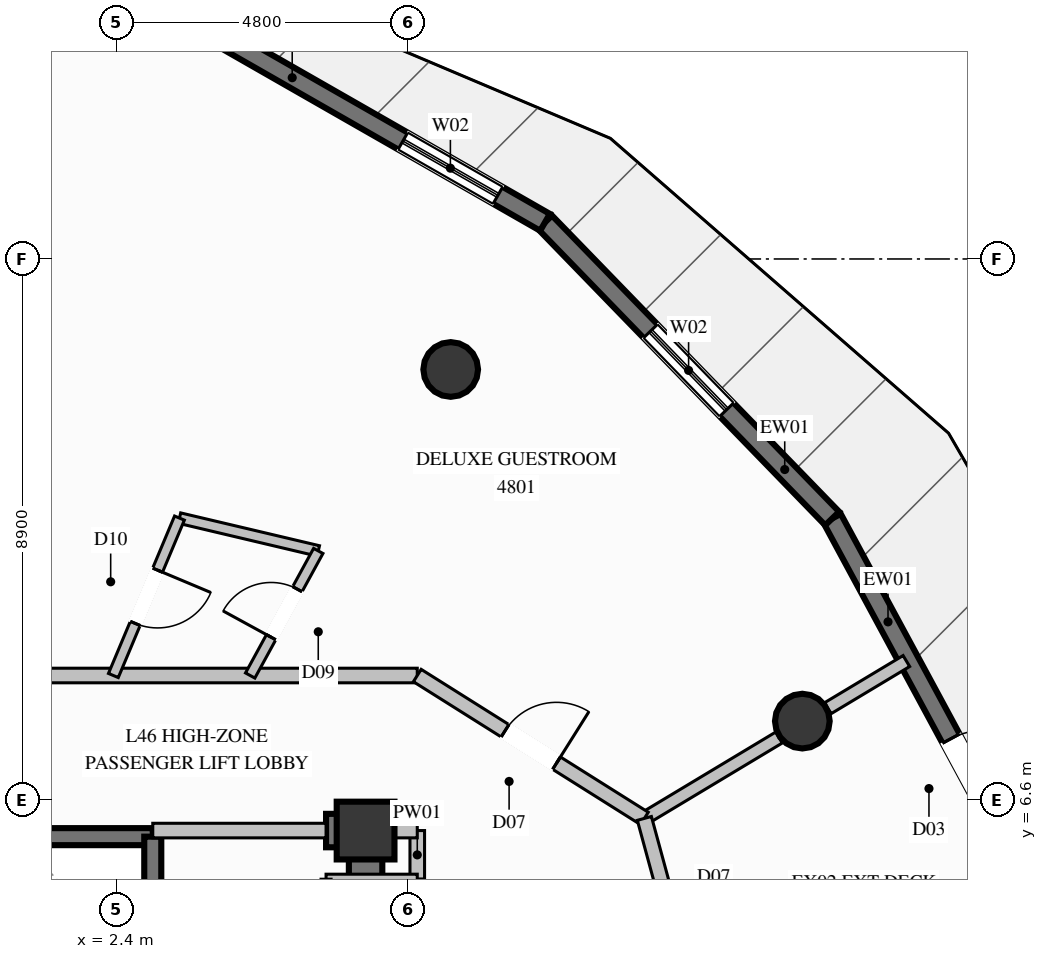
"""IFC4 building model, lengths in metres.
Left out: names, types, materials, properties, quantities, classifications, styles, units other than length and angle.
Written with IfcOpenShell. Run it as: python <this file> out.ifc"""

import sys

from ifc_helpers import new_model, si_unit, direction, frame, frame_2d, origin, origin_2d, place, context, subcontext, project, spatial, rectangle, circle, extrude, element, fill, save


model = new_model("IFC4")
c1 = context("Model", 3, precision=1e-05, world=origin(), true_north=direction((0.0, 1.0)))
c2 = subcontext(c1, "Body", "Model", "MODEL_VIEW")
j1 = project(units=[si_unit("LENGTHUNIT", "METRE"), si_unit("PLANEANGLEUNIT", "RADIAN")], contexts=[c1])
p1 = place(None, origin())
s1 = spatial("IfcSite", under=j1, at=p1, CompositionType="ELEMENT")
p2 = place(p1, origin())
s2 = spatial("IfcBuilding", under=s1, at=p2, CompositionType="ELEMENT")
p3 = place(p2, frame((0.0, 0.0, 180.4)))
s3 = spatial("IfcBuildingStorey", under=s2, at=p3, CompositionType="ELEMENT", Elevation=180.4)
p4 = place(p3, frame((6.5, 6.1, 0.0), z_axis=(0.0, 0.0, 1.0), x_axis=(1.0, 0.0, 0.0)))
e1 = element("IfcColumn", 1, at=p4, inside=s3, PredefinedType="COLUMN", context=c2, shape_type="SweptSolid", body=[
    extrude(rectangle(XDim=0.95, YDim=0.95, at=origin_2d()), origin(), (0.0, 0.0, 1.0), 3.6),
])
p5 = place(p3, frame((5.85, 6.1, 0.0), z_axis=(0.0, 0.0, 1.0), x_axis=(1.0, 0.0, 0.0)))
e2 = element("IfcWall", 2, at=p5, inside=s3, PredefinedType="SHEAR", context=c2, shape_type="SweptSolid", body=[
    extrude(rectangle(XDim=0.375, YDim=0.55, at=frame_2d((0.188, 0.0))), origin(), (0.0, 0.0, 1.0), 3.6),
])
p6 = place(p3, frame((6.5, 3.35, 0.0), z_axis=(0.0, 0.0, 1.0), x_axis=(0.0, 1.0, 0.0)))
e3 = element("IfcWall", 3, at=p6, inside=s3, PredefinedType="SHEAR", context=c2, shape_type="SweptSolid", body=[
    extrude(rectangle(XDim=3.025, YDim=0.55, at=frame_2d((1.512, 0.0))), origin(), (0.0, 0.0, 1.0), 3.6),
])
for number, where, z_axis, x_axis in (
    (4, (13.683, 7.9, 0.0), (0.0, 0.0, 1.0), (1.0, 0.0, 0.0)),
    (5, (7.9, 13.683, 0.0), (0.0, 0.0, 1.0), (1.0, 0.0, 0.0)),
):
    element("IfcColumn", number, at=place(p3, frame(where, z_axis=z_axis, x_axis=x_axis)), inside=s3, PredefinedType="COLUMN", context=c2, shape_type="SweptSolid", body=[
        extrude(circle(Radius=0.45, at=origin_2d()), origin(), (0.0, 0.0, 1.0), 3.6),
    ])
p7 = place(p3, frame((14.174, 11.232, 0.0), z_axis=(0.0, 0.0, 1.0), x_axis=(0.475159501302, -0.879899680829, 0.0)))
e6 = element("IfcWall", 6, at=p7, inside=s3, PredefinedType="SOLIDWALL", context=c2, shape_type="SweptSolid", body=[
    extrude(rectangle(XDim=6.785, YDim=0.32, at=frame_2d((3.393, 0.0))), origin(), (0.0, 0.0, 1.0), 3.36),
])
p8 = place(p7, frame((4.114, 0.0, 0.0)))
e7 = element("IfcOpeningElement", 7, at=p8, cuts=e6, PredefinedType="OPENING", context=c2, shape_type="SweptSolid", body=[
    extrude(rectangle(XDim=1.1, YDim=2.2, at=frame_2d((0.55, 1.1))), frame((0.0, 0.17, 0.0), z_axis=(0.0, -1.0, 0.0), x_axis=(1.0, 0.0, 0.0)), (0.0, 0.0, 1.0), 0.34),
])
p9 = place(p3, frame((9.451, 16.103, 0.0), z_axis=(0.0, 0.0, 1.0), x_axis=(0.696119985346, -0.71792545992, 0.0)))
e8 = element("IfcWall", 8, at=p9, inside=s3, PredefinedType="SOLIDWALL", context=c2, shape_type="SweptSolid", body=[
    extrude(rectangle(XDim=6.785, YDim=0.32, at=frame_2d((3.393, 0.0))), origin(), (0.0, 0.0, 1.0), 3.36),
])
p10 = place(p9, frame((2.492, 0.0, 0.35)))
e9 = element("IfcOpeningElement", 9, at=p10, cuts=e8, PredefinedType="OPENING", context=c2, shape_type="SweptSolid", body=[
    extrude(rectangle(XDim=1.8, YDim=2.6, at=frame_2d((0.9, 1.3))), frame((0.0, 0.17, 0.0), z_axis=(0.0, -1.0, 0.0), x_axis=(1.0, 0.0, 0.0)), (0.0, 0.0, 1.0), 0.34),
])
p11 = place(p3, frame((3.69, 19.398, 0.0), z_axis=(0.0, 0.0, 1.0), x_axis=(0.868052920032, -0.496471678974, 0.0)))
e10 = element("IfcWall", 10, at=p11, inside=s3, PredefinedType="SOLIDWALL", context=c2, shape_type="SweptSolid", body=[
    extrude(rectangle(XDim=6.637, YDim=0.32, at=frame_2d((3.318, 0.0))), origin(), (0.0, 0.0, 1.0), 3.36),
])
p12 = place(p11, frame((3.944, 0.0, 0.35)))
e11 = element("IfcOpeningElement", 11, at=p12, cuts=e10, PredefinedType="OPENING", context=c2, shape_type="SweptSolid", body=[
    extrude(rectangle(XDim=1.8, YDim=2.6, at=frame_2d((0.9, 1.3))), frame((0.0, 0.17, 0.0), z_axis=(0.0, -1.0, 0.0), x_axis=(1.0, 0.0, 0.0)), (0.0, 0.0, 1.0), 0.34),
])
p13 = place(p3, frame((3.0, 6.0, 0.0), z_axis=(0.0, 0.0, 1.0), x_axis=(-1.0, 0.0, 0.0)))
e12 = element("IfcWall", 12, at=p13, inside=s3, PredefinedType="SOLIDWALL", context=c2, shape_type="SweptSolid", body=[
    extrude(rectangle(XDim=2.2, YDim=0.28, at=frame_2d((1.1, 0.0))), origin(), (0.0, 0.0, 1.0), 3.36),
])
p14 = place(p3, frame((3.0, 3.5, 0.0), z_axis=(0.0, 0.0, 1.0), x_axis=(0.0, 1.0, 0.0)))
e13 = element("IfcWall", 13, at=p14, inside=s3, PredefinedType="SOLIDWALL", context=c2, shape_type="SweptSolid", body=[
    extrude(rectangle(XDim=2.5, YDim=0.28, at=frame_2d((1.25, 0.0))), origin(), (0.0, 0.0, 1.0), 3.36),
])
p15 = place(p3, frame((-7.35, 8.65, 0.0), z_axis=(0.0, 0.0, 1.0), x_axis=(1.0, 0.0, 0.0)))
e14 = element("IfcWall", 14, at=p15, inside=s3, PredefinedType="PARTITIONING", context=c2, shape_type="SweptSolid", body=[
    extrude(rectangle(XDim=14.7, YDim=0.24, at=frame_2d((7.35, 0.0))), origin(), (0.0, 0.0, 1.0), 3.36),
])
p16 = place(p3, frame((3.0, 6.1, 0.0), z_axis=(0.0, 0.0, 1.0), x_axis=(1.0, 0.0, 0.0)))
e15 = element("IfcWall", 15, at=p16, inside=s3, PredefinedType="PARTITIONING", context=c2, shape_type="SweptSolid", body=[
    extrude(rectangle(XDim=2.85, YDim=0.24, at=frame_2d((1.425, 0.0))), origin(), (0.0, 0.0, 1.0), 2.445),
])
p17 = place(p3, frame((7.35, 5.3, 0.0), z_axis=(0.0, 0.0, 1.0), x_axis=(0.0, 1.0, 0.0)))
e16 = element("IfcWall", 16, at=p17, inside=s3, PredefinedType="PARTITIONING", context=c2, shape_type="SweptSolid", body=[
    extrude(rectangle(XDim=0.8, YDim=0.24, at=frame_2d((0.4, 0.0))), origin(), (0.0, 0.0, 1.0), 2.445),
])
p18 = place(p3, frame((6.5, 6.1, 0.0), z_axis=(0.0, 0.0, 1.0), x_axis=(1.0, 0.0, 0.0)))
e17 = element("IfcWall", 17, at=p18, inside=s3, PredefinedType="PARTITIONING", context=c2, shape_type="SweptSolid", body=[
    extrude(rectangle(XDim=0.85, YDim=0.24, at=frame_2d((0.425, 0.0))), origin(), (0.0, 0.0, 1.0), 2.801),
])
p19 = place(p3, frame((7.35, 5.3, 0.0), z_axis=(0.0, 0.0, 1.0), x_axis=(-1.0, 0.0, 0.0)))
e18 = element("IfcWall", 18, at=p19, inside=s3, PredefinedType="PARTITIONING", context=c2, shape_type="SweptSolid", body=[
    extrude(rectangle(XDim=1.5, YDim=0.165, at=frame_2d((0.75, 0.0))), origin(), (0.0, 0.0, 1.0), 2.445),
])
p20 = place(p3, frame((5.85, 5.3, 0.0), z_axis=(0.0, 0.0, 1.0), x_axis=(0.0, -1.0, 0.0)))
e19 = element("IfcWall", 19, at=p20, inside=s3, PredefinedType="PARTITIONING", context=c2, shape_type="SweptSolid", body=[
    extrude(rectangle(XDim=2.55, YDim=0.165, at=frame_2d((1.275, 0.0))), origin(), (0.0, 0.0, 1.0), 2.445),
])
p21 = place(p3, frame((11.085, 6.3, 0.0), z_axis=(0.0, 0.0, 1.0), x_axis=(0.857259301733, 0.514884928497, 0.0)))
e20 = element("IfcWall", 20, at=p21, inside=s3, PredefinedType="PARTITIONING", context=c2, shape_type="SweptSolid", body=[
    extrude(rectangle(XDim=2.583, YDim=0.21, at=frame_2d((1.292, 0.0))), origin(), (0.0, 0.0, 1.0), 2.801),
])
p22 = place(p3, frame((14.102, 8.112, 0.0), z_axis=(0.0, 0.0, 1.0), x_axis=(0.85729274583, 0.514829241543, 0.0)))
e21 = element("IfcWall", 21, at=p22, inside=s3, PredefinedType="PARTITIONING", context=c2, shape_type="SweptSolid", body=[
    extrude(rectangle(XDim=1.507, YDim=0.21, at=frame_2d((0.753, 0.0))), origin(), (0.0, 0.0, 1.0), 3.36),
])
p23 = place(p3, frame((3.439, 11.239, 0.0), z_axis=(0.0, 0.0, 1.0), x_axis=(0.973143510765, -0.230199277704, 0.0)))
e22 = element("IfcWall", 22, at=p23, inside=s3, PredefinedType="PLUMBINGWALL", context=c2, shape_type="SweptSolid", body=[
    extrude(rectangle(XDim=2.346, YDim=0.175, at=frame_2d((1.173, 0.0))), origin(), (0.0, 0.0, 1.0), 3.36),
])
p24 = place(p3, frame((3.439, 11.239, 0.0), z_axis=(0.0, 0.0, 1.0), x_axis=(-0.387077273479, -0.922047278807, 0.0)))
e23 = element("IfcWall", 23, at=p24, inside=s3, PredefinedType="PLUMBINGWALL", context=c2, shape_type="SweptSolid", body=[
    extrude(rectangle(XDim=2.808, YDim=0.175, at=frame_2d((1.404, 0.0))), origin(), (0.0, 0.0, 1.0), 3.36),
])
p25 = place(p24, frame((0.929, 0.0, 0.0)))
e24 = element("IfcOpeningElement", 24, at=p25, cuts=e23, PredefinedType="OPENING", context=c2, shape_type="SweptSolid", body=[
    extrude(rectangle(XDim=0.95, YDim=2.1, at=frame_2d((0.475, 1.05))), frame((0.0, 0.098, 0.0), z_axis=(0.0, -1.0, 0.0), x_axis=(1.0, 0.0, 0.0)), (0.0, 0.0, 1.0), 0.195),
])
p26 = place(p3, frame((4.602, 8.65, 0.0), z_axis=(0.0, 0.0, 1.0), x_axis=(0.479577167617, 0.877499709573, 0.0)))
e25 = element("IfcWall", 25, at=p26, inside=s3, PredefinedType="PLUMBINGWALL", context=c2, shape_type="SweptSolid", body=[
    extrude(rectangle(XDim=2.335, YDim=0.175, at=frame_2d((1.167, 0.0))), origin(), (0.0, 0.0, 1.0), 3.36),
])
p27 = place(p26, frame((0.718, 0.0, 0.0)))
e26 = element("IfcOpeningElement", 26, at=p27, cuts=e25, PredefinedType="OPENING", context=c2, shape_type="SweptSolid", body=[
    extrude(rectangle(XDim=0.9, YDim=2.1, at=frame_2d((0.45, 1.05))), frame((0.0, 0.098, 0.0), z_axis=(0.0, -1.0, 0.0), x_axis=(1.0, 0.0, 0.0)), (0.0, 0.0, 1.0), 0.195),
])
p28 = place(p3, frame((7.35, 8.65, 0.0), z_axis=(0.0, 0.0, 1.0), x_axis=(0.846409267484, -0.532532958526, 0.0)))
e27 = element("IfcWall", 27, at=p28, inside=s3, PredefinedType="PARTITIONING", context=c2, shape_type="SweptSolid", body=[
    extrude(rectangle(XDim=4.413, YDim=0.24, at=frame_2d((2.206, 0.0))), origin(), (0.0, 0.0, 1.0), 3.36),
])
p29 = place(p28, frame((1.706, 0.0, 0.0)))
e28 = element("IfcOpeningElement", 28, at=p29, cuts=e27, PredefinedType="OPENING", context=c2, shape_type="SweptSolid", body=[
    extrude(rectangle(XDim=1.0, YDim=2.2, at=frame_2d((0.5, 1.1))), frame((0.0, 0.13, 0.0), z_axis=(0.0, -1.0, 0.0), x_axis=(1.0, 0.0, 0.0)), (0.0, 0.0, 1.0), 0.26),
])
p30 = place(p3, frame((12.08, 2.646, 0.0), z_axis=(0.0, 0.0, 1.0), x_axis=(-0.262762825819, 0.964860454868, 0.0)))
e29 = element("IfcWall", 29, at=p30, inside=s3, PredefinedType="PARTITIONING", context=c2, shape_type="SweptSolid", body=[
    extrude(rectangle(XDim=3.787, YDim=0.24, at=frame_2d((1.894, 0.0))), origin(), (0.0, 0.0, 1.0), 3.36),
])
p31 = place(p30, frame((1.394, 0.0, 0.0)))
e30 = element("IfcOpeningElement", 30, at=p31, cuts=e29, PredefinedType="OPENING", context=c2, shape_type="SweptSolid", body=[
    extrude(rectangle(XDim=1.0, YDim=2.2, at=frame_2d((0.5, 1.1))), frame((0.0, 0.13, 0.0), z_axis=(0.0, -1.0, 0.0), x_axis=(1.0, 0.0, 0.0)), (0.0, 0.0, 1.0), 0.26),
])
p32 = place(p8, origin())
e31 = element("IfcDoor", 31, at=p32, inside=s3, OperationType="SINGLE_SWING_RIGHT", PredefinedType="DOOR", context=c2, shape_type="SweptSolid", body=[
    extrude(rectangle(XDim=1.1, YDim=2.2, at=frame_2d((0.55, 1.1))), frame((0.0, 0.025, 0.0), z_axis=(0.0, -1.0, 0.0), x_axis=(1.0, 0.0, 0.0)), (0.0, 0.0, 1.0), 0.05),
])
fill(e7, e31)
p33 = place(p10, origin())
e32 = element("IfcWindow", 32, at=p33, inside=s3, PartitioningType="SINGLE_PANEL", PredefinedType="WINDOW", context=c2, shape_type="SweptSolid", body=[
    extrude(rectangle(XDim=1.8, YDim=2.6, at=frame_2d((0.9, 1.3))), frame((0.0, 0.03, 0.0), z_axis=(0.0, -1.0, 0.0), x_axis=(1.0, 0.0, 0.0)), (0.0, 0.0, 1.0), 0.06),
])
fill(e9, e32)
p34 = place(p12, origin())
e33 = element("IfcWindow", 33, at=p34, inside=s3, PartitioningType="SINGLE_PANEL", PredefinedType="WINDOW", context=c2, shape_type="SweptSolid", body=[
    extrude(rectangle(XDim=1.8, YDim=2.6, at=frame_2d((0.9, 1.3))), frame((0.0, 0.03, 0.0), z_axis=(0.0, -1.0, 0.0), x_axis=(1.0, 0.0, 0.0)), (0.0, 0.0, 1.0), 0.06),
])
fill(e11, e33)
p35 = place(p27, origin())
e34 = element("IfcDoor", 34, at=p35, inside=s3, OperationType="SINGLE_SWING_LEFT", PredefinedType="DOOR", context=c2, shape_type="SweptSolid", body=[
    extrude(rectangle(XDim=0.9, YDim=2.1, at=frame_2d((0.45, 1.05))), frame((0.0, 0.025, 0.0), z_axis=(0.0, -1.0, 0.0), x_axis=(1.0, 0.0, 0.0)), (0.0, 0.0, 1.0), 0.05),
])
fill(e26, e34)
p36 = place(p29, origin())
e35 = element("IfcDoor", 35, at=p36, inside=s3, OperationType="SINGLE_SWING_RIGHT", PredefinedType="DOOR", context=c2, shape_type="SweptSolid", body=[
    extrude(rectangle(XDim=1.0, YDim=2.2, at=frame_2d((0.5, 1.1))), frame((0.0, 0.025, 0.0), z_axis=(0.0, -1.0, 0.0), x_axis=(1.0, 0.0, 0.0)), (0.0, 0.0, 1.0), 0.05),
])
fill(e28, e35)
p37 = place(p25, origin())
e36 = element("IfcDoor", 36, at=p37, inside=s3, OperationType="SINGLE_SWING_LEFT", PredefinedType="DOOR", context=c2, shape_type="SweptSolid", body=[
    extrude(rectangle(XDim=0.95, YDim=2.1, at=frame_2d((0.475, 1.05))), frame((0.0, 0.025, 0.0), z_axis=(0.0, -1.0, 0.0), x_axis=(1.0, 0.0, 0.0)), (0.0, 0.0, 1.0), 0.05),
])
fill(e24, e36)
save(model, sys.argv[1])
